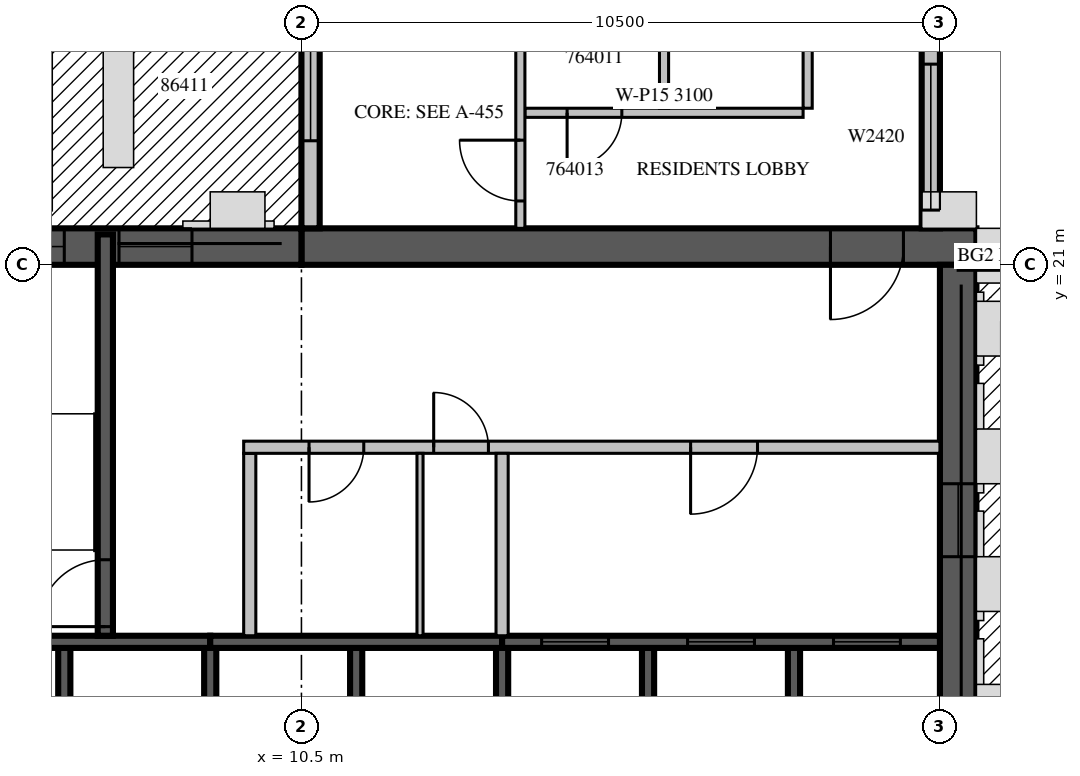
"""IFC4 building model, lengths in metres.
Left out: names, types, materials, properties, quantities, classifications, styles, units other than length and angle.
Written with IfcOpenShell. Run it as: python <this file> out.ifc"""

import sys

from ifc_helpers import new_model, si_unit, direction, frame, frame_2d, origin, place, context, subcontext, project, spatial, rectangle, extrude, source, transform, mapped, element, fill, save


model = new_model("IFC4")
c1 = context("Model", 3, precision=1e-05, world=origin(), true_north=direction((0.0, 1.0)))
c2 = subcontext(c1, "Body", "Model", "MODEL_VIEW")
j1 = project(units=[si_unit("LENGTHUNIT", "METRE"), si_unit("PLANEANGLEUNIT", "RADIAN")], contexts=[c1])
p1 = place(None, origin())
s1 = spatial("IfcSite", under=j1, at=p1, CompositionType="ELEMENT")
p2 = place(p1, origin())
s2 = spatial("IfcBuilding", under=s1, at=p2, CompositionType="ELEMENT")
p3 = place(p2, frame((0.0, 0.0, 284.5)))
s3 = spatial("IfcBuildingStorey", under=s2, at=p3, CompositionType="ELEMENT", Elevation=284.5)
p4 = place(p3, frame((10.5, 21.3, 0.0), z_axis=(0.0, 0.0, 1.0), x_axis=(1.0, 0.0, 0.0)))
e1 = element("IfcWall", 1, at=p4, inside=s3, PredefinedType="SHEAR", context=c2, shape_type="SweptSolid", body=[
    extrude(rectangle(XDim=11.1, YDim=0.6, at=frame_2d((5.55, 0.0))), origin(), (0.0, 0.0, 1.0), 3.5),
])
p5 = place(p4, frame((8.7, 0.0, 0.0)))
e2 = element("IfcOpeningElement", 2, at=p5, cuts=e1, PredefinedType="OPENING", context=c2, shape_type="SweptSolid", body=[
    extrude(rectangle(XDim=1.2, YDim=2.1, at=frame_2d((0.6, 1.05))), frame((0.0, 0.31, 0.0), z_axis=(0.0, -1.0, 0.0), x_axis=(1.0, 0.0, 0.0)), (0.0, 0.0, 1.0), 0.62),
])
p6 = place(p3, frame((21.3, 10.5, 0.0), z_axis=(0.0, 0.0, 1.0), x_axis=(0.0, 1.0, 0.0)))
e3 = element("IfcWall", 3, at=p6, inside=s3, PredefinedType="SHEAR", context=c2, shape_type="SweptSolid", body=[
    extrude(rectangle(XDim=10.5, YDim=0.6, at=frame_2d((5.25, 0.0))), origin(), (0.0, 0.0, 1.0), 3.5),
])
p7 = place(p6, frame((5.7, 0.0, 0.6)))
e4 = element("IfcOpeningElement", 4, at=p7, cuts=e3, PredefinedType="OPENING", context=c2, shape_type="SweptSolid", body=[
    extrude(rectangle(XDim=1.2, YDim=2.4, at=frame_2d((0.6, 1.2))), frame((0.0, 0.31, 0.0), z_axis=(0.0, -1.0, 0.0), x_axis=(1.0, 0.0, 0.0)), (0.0, 0.0, 1.0), 0.62),
])
p8 = place(p3, frame((3.9, 21.3, 0.0), z_axis=(0.0, 0.0, 1.0), x_axis=(1.0, 0.0, 0.0)))
e5 = element("IfcWall", 5, at=p8, inside=s3, PredefinedType="SHEAR", context=c2, shape_type="SweptSolid", body=[
    extrude(rectangle(XDim=6.6, YDim=0.6, at=frame_2d((3.3, 0.0))), origin(), (0.0, 0.0, 1.0), 3.5),
])
m1 = source(origin(), c2, "Body", "SweptSolid", [
    extrude(rectangle(XDim=1.2, YDim=2.4, at=frame_2d((0.6, 1.2))), frame((0.0, 0.31, 0.0), z_axis=(0.0, -1.0, 0.0), x_axis=(1.0, 0.0, 0.0)), (0.0, 0.0, 1.0), 0.62),
])
p9 = place(p8, frame((1.5, 0.0, 0.6)))
e6 = element("IfcOpeningElement", 6, at=p9, cuts=e5, PredefinedType="OPENING", context=c2, shape_type="MappedRepresentation", body=[
    mapped(m1, transform((0.0, 0.0, 0.0), scale=1.0)),
])
p10 = place(p8, frame((3.6, 0.0, 0.6)))
e7 = element("IfcOpeningElement", 7, at=p10, cuts=e5, PredefinedType="OPENING", context=c2, shape_type="MappedRepresentation", body=[
    mapped(m1, transform((0.0, 0.0, 0.0), scale=1.0)),
])
m2 = source(origin(), c2, "Body", "SweptSolid", [
    extrude(rectangle(XDim=7.45, YDim=0.3, at=frame_2d((3.725, 0.0))), origin(), (0.0, 0.0, 1.0), 3.1),
])
p11 = place(p3, frame((20.85, 21.6, 0.0), z_axis=(0.0, 0.0, 1.0), x_axis=(0.0, 1.0, 0.0)))
e8 = element("IfcWall", 8, at=p11, inside=s3, PredefinedType="STANDARD", context=c2, shape_type="MappedRepresentation", body=[
    mapped(m2, transform((0.0, 0.0, 0.0), scale=1.0)),
])
m3 = source(origin(), c2, "Body", "SweptSolid", [
    extrude(rectangle(XDim=2.4, YDim=2.0, at=frame_2d((1.2, 1.0))), frame((0.0, 0.16, 0.0), z_axis=(0.0, -1.0, 0.0), x_axis=(1.0, 0.0, 0.0)), (0.0, 0.0, 1.0), 0.32),
])
p12 = place(p11, frame((0.3, 0.0, 0.6)))
e9 = element("IfcOpeningElement", 9, at=p12, cuts=e8, PredefinedType="OPENING", context=c2, shape_type="MappedRepresentation", body=[
    mapped(m3, transform((0.0, 0.0, 0.0), scale=1.0)),
])
m4 = source(origin(), c2, "Body", "SweptSolid", [
    extrude(rectangle(XDim=3.0, YDim=2.0, at=frame_2d((1.5, 1.0))), frame((0.0, 0.16, 0.0), z_axis=(0.0, -1.0, 0.0), x_axis=(1.0, 0.0, 0.0)), (0.0, 0.0, 1.0), 0.32),
])
p13 = place(p11, frame((4.2, 0.0, 0.6)))
e10 = element("IfcOpeningElement", 10, at=p13, cuts=e8, PredefinedType="OPENING", context=c2, shape_type="MappedRepresentation", body=[
    mapped(m4, transform((0.0, 0.0, 0.0), scale=1.0)),
])
p14 = place(p3, frame((10.65, 29.05, 0.0), z_axis=(0.0, 0.0, 1.0), x_axis=(0.0, -1.0, 0.0)))
e11 = element("IfcWall", 11, at=p14, inside=s3, PredefinedType="STANDARD", context=c2, shape_type="MappedRepresentation", body=[
    mapped(m2, transform((0.0, 0.0, 0.0), scale=1.0)),
])
m5 = source(origin(), c2, "Body", "SweptSolid", [
    extrude(rectangle(XDim=1.8, YDim=2.4, at=frame_2d((0.9, 1.2))), frame((0.0, 0.16, 0.0), z_axis=(0.0, -1.0, 0.0), x_axis=(1.0, 0.0, 0.0)), (0.0, 0.0, 1.0), 0.32),
])
p15 = place(p14, frame((4.21, 0.0, 0.0)))
e12 = element("IfcOpeningElement", 12, at=p15, cuts=e11, PredefinedType="OPENING", context=c2, shape_type="MappedRepresentation", body=[
    mapped(m5, transform((0.0, 0.0, 0.0), scale=1.0)),
])
p16 = place(p14, frame((0.855, 0.0, 0.6)))
e13 = element("IfcOpeningElement", 13, at=p16, cuts=e11, PredefinedType="OPENING", context=c2, shape_type="MappedRepresentation", body=[
    mapped(m3, transform((0.0, 0.0, 0.0), scale=1.0)),
])
p17 = place(p3, frame((6.6, 11.7, 0.0), z_axis=(0.0, 0.0, 1.0), x_axis=(0.0, 1.0, 0.0)))
e14 = element("IfcWall", 14, at=p17, inside=s3, PredefinedType="SOLIDWALL", context=c2, shape_type="SweptSolid", body=[
    extrude(rectangle(XDim=3.0, YDim=0.2, at=frame_2d((1.5, 0.0))), origin(), (0.0, 0.0, 1.0), 3.5),
])
p18 = place(p3, frame((9.0, 11.7, 0.0), z_axis=(0.0, 0.0, 1.0), x_axis=(0.0, 1.0, 0.0)))
e15 = element("IfcWall", 15, at=p18, inside=s3, PredefinedType="SOLIDWALL", context=c2, shape_type="SweptSolid", body=[
    extrude(rectangle(XDim=3.0, YDim=0.2, at=frame_2d((1.5, 0.0))), origin(), (0.0, 0.0, 1.0), 3.1),
])
m6 = source(origin(), c2, "Body", "SweptSolid", [
    extrude(rectangle(XDim=3.0, YDim=0.2, at=frame_2d((1.5, 0.0))), origin(), (0.0, 0.0, 1.0), 3.1),
])
for number, where, z_axis, x_axis in (
    (16, (11.4, 11.7, 0.0), (0.0, 0.0, 1.0), (0.0, 1.0, 0.0)),
    (17, (13.8, 11.7, 0.0), (0.0, 0.0, 1.0), (0.0, 1.0, 0.0)),
):
    element("IfcWall", number, at=place(p3, frame(where, z_axis=z_axis, x_axis=x_axis)), inside=s3, PredefinedType="SOLIDWALL", context=c2, shape_type="MappedRepresentation", body=[
        mapped(m6, transform((0.0, 0.0, 0.0), scale=1.0)),
    ])
m7 = source(origin(), c2, "Body", "SweptSolid", [
    extrude(rectangle(XDim=3.0, YDim=0.2, at=frame_2d((1.5, 0.0))), origin(), (0.0, 0.0, 1.0), 3.5),
])
for number, where, z_axis, x_axis in (
    (18, (16.2, 11.7, 0.0), (0.0, 0.0, 1.0), (0.0, 1.0, 0.0)),
    (19, (18.6, 11.7, 0.0), (0.0, 0.0, 1.0), (0.0, 1.0, 0.0)),
):
    element("IfcWall", number, at=place(p3, frame(where, z_axis=z_axis, x_axis=x_axis)), inside=s3, PredefinedType="SOLIDWALL", context=c2, shape_type="MappedRepresentation", body=[
        mapped(m7, transform((0.0, 0.0, 0.0), scale=1.0)),
    ])
m8 = source(origin(), c2, "Body", "SweptSolid", [
    extrude(rectangle(XDim=4.8, YDim=0.2, at=frame_2d((2.4, 0.0))), origin(), (0.0, 0.0, 1.0), 3.5),
])
p19 = place(p3, frame((4.2, 14.8, 0.0), z_axis=(0.0, 0.0, 1.0), x_axis=(1.0, 0.0, 0.0)))
e20 = element("IfcWall", 20, at=p19, inside=s3, PredefinedType="SOLIDWALL", context=c2, shape_type="MappedRepresentation", body=[
    mapped(m8, transform((0.0, 0.0, 0.0), scale=1.0)),
])
m9 = source(origin(), c2, "Body", "SweptSolid", [
    extrude(rectangle(XDim=4.8, YDim=0.2, at=frame_2d((2.4, 0.0))), origin(), (0.0, 0.0, 1.0), 3.1),
])
p20 = place(p3, frame((9.0, 14.8, 0.0), z_axis=(0.0, 0.0, 1.0), x_axis=(1.0, 0.0, 0.0)))
e21 = element("IfcWall", 21, at=p20, inside=s3, PredefinedType="SOLIDWALL", context=c2, shape_type="MappedRepresentation", body=[
    mapped(m9, transform((0.0, 0.0, 0.0), scale=1.0)),
])
m10 = source(origin(), c2, "Body", "SweptSolid", [
    extrude(rectangle(XDim=7.2, YDim=0.2, at=frame_2d((3.6, 0.0))), origin(), (0.0, 0.0, 1.0), 3.5),
])
p21 = place(p3, frame((13.8, 14.8, 0.0), z_axis=(0.0, 0.0, 1.0), x_axis=(1.0, 0.0, 0.0)))
e22 = element("IfcWall", 22, at=p21, inside=s3, PredefinedType="SOLIDWALL", context=c2, shape_type="MappedRepresentation", body=[
    mapped(m10, transform((0.0, 0.0, 0.0), scale=1.0)),
])
m11 = source(origin(), c2, "Body", "SweptSolid", [
    extrude(rectangle(XDim=1.1, YDim=2.1, at=frame_2d((0.55, 1.05))), frame((0.0, 0.11, 0.0), z_axis=(0.0, -1.0, 0.0), x_axis=(1.0, 0.0, 0.0)), (0.0, 0.0, 1.0), 0.22),
])
p22 = place(p21, frame((0.65, 0.0, 0.0)))
e23 = element("IfcOpeningElement", 23, at=p22, cuts=e22, PredefinedType="OPENING", context=c2, shape_type="MappedRepresentation", body=[
    mapped(m11, transform((0.0, 0.0, 0.0), scale=1.0)),
])
p23 = place(p21, frame((3.05, 0.0, 0.0)))
e24 = element("IfcOpeningElement", 24, at=p23, cuts=e22, PredefinedType="OPENING", context=c2, shape_type="MappedRepresentation", body=[
    mapped(m11, transform((0.0, 0.0, 0.0), scale=1.0)),
])
p24 = place(p21, frame((5.45, 0.0, 0.0)))
e25 = element("IfcOpeningElement", 25, at=p24, cuts=e22, PredefinedType="OPENING", context=c2, shape_type="MappedRepresentation", body=[
    mapped(m11, transform((0.0, 0.0, 0.0), scale=1.0)),
])
p25 = place(p3, frame((7.275, 14.9, 0.0), z_axis=(0.0, 0.0, 1.0), x_axis=(0.0, 1.0, 0.0)))
e26 = element("IfcWall", 26, at=p25, inside=s3, PredefinedType="SOLIDWALL", context=c2, shape_type="SweptSolid", body=[
    extrude(rectangle(XDim=6.6, YDim=0.25, at=frame_2d((3.3, 0.0))), origin(), (0.0, 0.0, 1.0), 3.1),
])
m12 = source(origin(), c2, "Body", "SweptSolid", [
    extrude(rectangle(XDim=1.1, YDim=2.1, at=frame_2d((0.55, 1.05))), frame((0.0, 0.135, 0.0), z_axis=(0.0, -1.0, 0.0), x_axis=(1.0, 0.0, 0.0)), (0.0, 0.0, 1.0), 0.27),
])
p26 = place(p25, frame((0.15, 0.0, 0.0)))
e27 = element("IfcOpeningElement", 27, at=p26, cuts=e26, PredefinedType="OPENING", context=c2, shape_type="MappedRepresentation", body=[
    mapped(m12, transform((0.0, 0.0, 0.0), scale=1.0)),
])
p27 = place(p3, frame((9.65, 14.9, 0.0), z_axis=(0.0, 0.0, 1.0), x_axis=(0.0, 1.0, 0.0)))
e28 = element("IfcWall", 28, at=p27, inside=s3, PredefinedType="PARTITIONING", context=c2, shape_type="SweptSolid", body=[
    extrude(rectangle(XDim=3.0, YDim=0.2, at=frame_2d((1.5, 0.0))), origin(), (0.0, 0.0, 1.0), 3.1),
])
p28 = place(p3, frame((9.55, 18.0, 0.0), z_axis=(0.0, 0.0, 1.0), x_axis=(1.0, 0.0, 0.0)))
e29 = element("IfcWall", 29, at=p28, inside=s3, PredefinedType="PARTITIONING", context=c2, shape_type="SweptSolid", body=[
    extrude(rectangle(XDim=11.45, YDim=0.2, at=frame_2d((5.725, 0.0))), origin(), (0.0, 0.0, 1.0), 3.1),
])
m13 = source(origin(), c2, "Body", "SweptSolid", [
    extrude(rectangle(XDim=0.9, YDim=2.1, at=frame_2d((0.45, 1.05))), frame((0.0, 0.11, 0.0), z_axis=(0.0, -1.0, 0.0), x_axis=(1.0, 0.0, 0.0)), (0.0, 0.0, 1.0), 0.22),
])
p29 = place(p28, frame((1.075, 0.0, 0.0)))
e30 = element("IfcOpeningElement", 30, at=p29, cuts=e29, PredefinedType="OPENING", context=c2, shape_type="MappedRepresentation", body=[
    mapped(m13, transform((0.0, 0.0, 0.0), scale=1.0)),
])
p30 = place(p28, frame((3.125, 0.0, 0.0)))
e31 = element("IfcOpeningElement", 31, at=p30, cuts=e29, PredefinedType="OPENING", context=c2, shape_type="MappedRepresentation", body=[
    mapped(m13, transform((0.0, 0.0, 0.0), scale=1.0)),
])
p31 = place(p28, frame((7.35, 0.0, 0.0)))
e32 = element("IfcOpeningElement", 32, at=p31, cuts=e29, PredefinedType="OPENING", context=c2, shape_type="MappedRepresentation", body=[
    mapped(m11, transform((0.0, 0.0, 0.0), scale=1.0)),
])
m14 = source(origin(), c2, "Body", "SweptSolid", [
    extrude(rectangle(XDim=3.0, YDim=0.2, at=frame_2d((1.5, 0.0))), origin(), (0.0, 0.0, 1.0), 3.1),
])
p32 = place(p3, frame((13.8, 14.9, 0.0), z_axis=(0.0, 0.0, 1.0), x_axis=(0.0, 1.0, 0.0)))
e33 = element("IfcWall", 33, at=p32, inside=s3, PredefinedType="PARTITIONING", context=c2, shape_type="MappedRepresentation", body=[
    mapped(m14, transform((0.0, 0.0, 0.0), scale=1.0)),
])
p33 = place(p3, frame((12.45, 14.9, 0.0), z_axis=(0.0, 0.0, 1.0), x_axis=(0.0, 1.0, 0.0)))
e34 = element("IfcWall", 34, at=p33, inside=s3, PredefinedType="PARTITIONING", context=c2, shape_type="SweptSolid", body=[
    extrude(rectangle(XDim=3.0, YDim=0.1, at=frame_2d((1.5, 0.0))), origin(), (0.0, 0.0, 1.0), 3.1),
])
m15 = source(origin(), c2, "Body", "SweptSolid", [
    extrude(rectangle(XDim=4.575, YDim=0.15, at=frame_2d((2.288, 0.0))), origin(), (0.0, 0.0, 1.0), 3.1),
])
p34 = place(p3, frame((14.175, 23.5, 0.0), z_axis=(0.0, 0.0, 1.0), x_axis=(1.0, 0.0, 0.0)))
e35 = element("IfcWall", 35, at=p34, inside=s3, PredefinedType="PARTITIONING", context=c2, shape_type="MappedRepresentation", body=[
    mapped(m15, transform((0.0, 0.0, 0.0), scale=1.0)),
])
m16 = source(origin(), c2, "Body", "SweptSolid", [
    extrude(rectangle(XDim=0.9, YDim=2.1, at=frame_2d((0.45, 1.05))), frame((0.0, 0.085, 0.0), z_axis=(0.0, -1.0, 0.0), x_axis=(1.0, 0.0, 0.0)), (0.0, 0.0, 1.0), 0.17),
])
p35 = place(p34, frame((0.694, 0.0, 0.0)))
e36 = element("IfcOpeningElement", 36, at=p35, cuts=e35, PredefinedType="OPENING", context=c2, shape_type="MappedRepresentation", body=[
    mapped(m16, transform((0.0, 0.0, 0.0), scale=1.0)),
])
m17 = source(origin(), c2, "Body", "SweptSolid", [
    extrude(rectangle(XDim=5.75, YDim=0.15, at=frame_2d((2.875, 0.0))), origin(), (0.0, 0.0, 1.0), 3.1),
])
p36 = place(p3, frame((18.825, 23.575, 0.0), z_axis=(0.0, 0.0, 1.0), x_axis=(0.0, 1.0, 0.0)))
e37 = element("IfcWall", 37, at=p36, inside=s3, PredefinedType="PARTITIONING", context=c2, shape_type="MappedRepresentation", body=[
    mapped(m17, transform((0.0, 0.0, 0.0), scale=1.0)),
])
m18 = source(origin(), c2, "Body", "SweptSolid", [
    extrude(rectangle(XDim=1.0, YDim=2.1, at=frame_2d((0.5, 1.05))), frame((0.0, 0.085, 0.0), z_axis=(0.0, -1.0, 0.0), x_axis=(1.0, 0.0, 0.0)), (0.0, 0.0, 1.0), 0.17),
])
p37 = place(p36, frame((2.375, 0.0, 0.0)))
e38 = element("IfcOpeningElement", 38, at=p37, cuts=e37, PredefinedType="OPENING", context=c2, shape_type="MappedRepresentation", body=[
    mapped(m18, transform((0.0, 0.0, 0.0), scale=1.0)),
])
p38 = place(p3, frame((16.463, 23.575, 0.0), z_axis=(0.0, 0.0, 1.0), x_axis=(0.0, 1.0, 0.0)))
e39 = element("IfcWall", 39, at=p38, inside=s3, PredefinedType="PARTITIONING", context=c2, shape_type="MappedRepresentation", body=[
    mapped(m17, transform((0.0, 0.0, 0.0), scale=1.0)),
])
m19 = source(origin(), c2, "Body", "SweptSolid", [
    extrude(rectangle(XDim=7.725, YDim=0.15, at=frame_2d((3.862, 0.0))), origin(), (0.0, 0.0, 1.0), 3.1),
])
p39 = place(p3, frame((14.1, 29.325, 0.0), z_axis=(0.0, 0.0, 1.0), x_axis=(0.0, -1.0, 0.0)))
e40 = element("IfcWall", 40, at=p39, inside=s3, PredefinedType="PARTITIONING", context=c2, shape_type="MappedRepresentation", body=[
    mapped(m19, transform((0.0, 0.0, 0.0), scale=1.0)),
])
p40 = place(p39, frame((6.275, 0.0, 0.0)))
e41 = element("IfcOpeningElement", 41, at=p40, cuts=e40, PredefinedType="OPENING", context=c2, shape_type="MappedRepresentation", body=[
    mapped(m18, transform((0.0, 0.0, 0.0), scale=1.0)),
])
m20 = source(origin(), c2, "Body", "SweptSolid", [
    extrude(rectangle(XDim=2.4, YDim=2.0, at=frame_2d((1.2, 1.0))), frame((0.0, 0.03, 0.0), z_axis=(0.0, -1.0, 0.0), x_axis=(1.0, 0.0, 0.0)), (0.0, 0.0, 1.0), 0.06),
])
p41 = place(p12, origin())
e42 = element("IfcWindow", 42, at=p41, inside=s3, PartitioningType="SINGLE_PANEL", PredefinedType="WINDOW", context=c2, shape_type="MappedRepresentation", body=[
    mapped(m20, transform((0.0, 0.0, 0.0), scale=1.0)),
])
fill(e9, e42)
m21 = source(origin(), c2, "Body", "SweptSolid", [
    extrude(rectangle(XDim=1.8, YDim=2.4, at=frame_2d((0.9, 1.2))), frame((0.0, 0.025, 0.0), z_axis=(0.0, -1.0, 0.0), x_axis=(1.0, 0.0, 0.0)), (0.0, 0.0, 1.0), 0.05),
])
p42 = place(p15, origin())
e43 = element("IfcDoor", 43, at=p42, inside=s3, OperationType="SLIDING_TO_LEFT", PredefinedType="DOOR", context=c2, shape_type="MappedRepresentation", body=[
    mapped(m21, transform((0.0, 0.0, 0.0), scale=1.0)),
])
fill(e12, e43)
m22 = source(origin(), c2, "Body", "SweptSolid", [
    extrude(rectangle(XDim=1.1, YDim=2.1, at=frame_2d((0.55, 1.05))), frame((0.0, 0.025, 0.0), z_axis=(0.0, -1.0, 0.0), x_axis=(1.0, 0.0, 0.0)), (0.0, 0.0, 1.0), 0.05),
])
p43 = place(p22, origin())
e44 = element("IfcDoor", 44, at=p43, inside=s3, OperationType="SLIDING_TO_LEFT", PredefinedType="DOOR", context=c2, shape_type="MappedRepresentation", body=[
    mapped(m22, transform((0.0, 0.0, 0.0), scale=1.0)),
])
fill(e23, e44)
p44 = place(p23, origin())
e45 = element("IfcDoor", 45, at=p44, inside=s3, OperationType="SLIDING_TO_LEFT", PredefinedType="DOOR", context=c2, shape_type="MappedRepresentation", body=[
    mapped(m22, transform((0.0, 0.0, 0.0), scale=1.0)),
])
fill(e24, e45)
p45 = place(p24, origin())
e46 = element("IfcDoor", 46, at=p45, inside=s3, OperationType="SLIDING_TO_LEFT", PredefinedType="DOOR", context=c2, shape_type="MappedRepresentation", body=[
    mapped(m22, transform((0.0, 0.0, 0.0), scale=1.0)),
])
fill(e25, e46)
p46 = place(p26, origin())
e47 = element("IfcDoor", 47, at=p46, inside=s3, OperationType="SINGLE_SWING_LEFT", PredefinedType="DOOR", context=c2, shape_type="MappedRepresentation", body=[
    mapped(m22, transform((0.0, 0.0, 0.0), scale=1.0)),
])
fill(e27, e47)
m23 = source(origin(), c2, "Body", "SweptSolid", [
    extrude(rectangle(XDim=0.9, YDim=2.1, at=frame_2d((0.45, 1.05))), frame((0.0, 0.025, 0.0), z_axis=(0.0, -1.0, 0.0), x_axis=(1.0, 0.0, 0.0)), (0.0, 0.0, 1.0), 0.05),
])
p47 = place(p29, origin())
e48 = element("IfcDoor", 48, at=p47, inside=s3, OperationType="SINGLE_SWING_RIGHT", PredefinedType="DOOR", context=c2, shape_type="MappedRepresentation", body=[
    mapped(m23, transform((0.0, 0.0, 0.0), scale=1.0)),
])
fill(e30, e48)
p48 = place(p30, origin())
e49 = element("IfcDoor", 49, at=p48, inside=s3, OperationType="SINGLE_SWING_LEFT", PredefinedType="DOOR", context=c2, shape_type="MappedRepresentation", body=[
    mapped(m23, transform((0.0, 0.0, 0.0), scale=1.0)),
])
fill(e31, e49)
p49 = place(p31, origin())
e50 = element("IfcDoor", 50, at=p49, inside=s3, OperationType="SINGLE_SWING_RIGHT", PredefinedType="DOOR", context=c2, shape_type="MappedRepresentation", body=[
    mapped(m22, transform((0.0, 0.0, 0.0), scale=1.0)),
])
fill(e32, e50)
m24 = source(origin(), c2, "Body", "SweptSolid", [
    extrude(rectangle(XDim=1.2, YDim=2.1, at=frame_2d((0.6, 1.05))), frame((0.0, 0.025, 0.0), z_axis=(0.0, -1.0, 0.0), x_axis=(1.0, 0.0, 0.0)), (0.0, 0.0, 1.0), 0.05),
])
p50 = place(p5, origin())
e51 = element("IfcDoor", 51, at=p50, inside=s3, OperationType="SINGLE_SWING_RIGHT", PredefinedType="DOOR", context=c2, shape_type="MappedRepresentation", body=[
    mapped(m24, transform((0.0, 0.0, 0.0), scale=1.0)),
])
fill(e2, e51)
p51 = place(p7, origin())
e52 = element("IfcWindow", 52, at=p51, inside=s3, PartitioningType="SINGLE_PANEL", PredefinedType="WINDOW", context=c2, shape_type="SweptSolid", body=[
    extrude(rectangle(XDim=1.2, YDim=2.4, at=frame_2d((0.6, 1.2))), frame((0.0, 0.03, 0.0), z_axis=(0.0, -1.0, 0.0), x_axis=(1.0, 0.0, 0.0)), (0.0, 0.0, 1.0), 0.06),
])
fill(e4, e52)
m25 = source(origin(), c2, "Body", "SweptSolid", [
    extrude(rectangle(XDim=1.2, YDim=2.4, at=frame_2d((0.6, 1.2))), frame((0.0, 0.03, 0.0), z_axis=(0.0, -1.0, 0.0), x_axis=(1.0, 0.0, 0.0)), (0.0, 0.0, 1.0), 0.06),
])
p52 = place(p9, origin())
e53 = element("IfcWindow", 53, at=p52, inside=s3, PartitioningType="SINGLE_PANEL", PredefinedType="WINDOW", context=c2, shape_type="MappedRepresentation", body=[
    mapped(m25, transform((0.0, 0.0, 0.0), scale=1.0)),
])
fill(e6, e53)
p53 = place(p10, origin())
e54 = element("IfcWindow", 54, at=p53, inside=s3, PartitioningType="SINGLE_PANEL", PredefinedType="WINDOW", context=c2, shape_type="MappedRepresentation", body=[
    mapped(m25, transform((0.0, 0.0, 0.0), scale=1.0)),
])
fill(e7, e54)
p54 = place(p35, origin())
e55 = element("IfcDoor", 55, at=p54, inside=s3, OperationType="SINGLE_SWING_RIGHT", PredefinedType="DOOR", context=c2, shape_type="MappedRepresentation", body=[
    mapped(m23, transform((0.0, 0.0, 0.0), scale=1.0)),
])
fill(e36, e55)
m26 = source(origin(), c2, "Body", "SweptSolid", [
    extrude(rectangle(XDim=1.0, YDim=2.1, at=frame_2d((0.5, 1.05))), frame((0.0, 0.025, 0.0), z_axis=(0.0, -1.0, 0.0), x_axis=(1.0, 0.0, 0.0)), (0.0, 0.0, 1.0), 0.05),
])
p55 = place(p40, origin())
e56 = element("IfcDoor", 56, at=p55, inside=s3, OperationType="SINGLE_SWING_RIGHT", PredefinedType="DOOR", context=c2, shape_type="MappedRepresentation", body=[
    mapped(m26, transform((0.0, 0.0, 0.0), scale=1.0)),
])
fill(e41, e56)
save(model, sys.argv[1])
